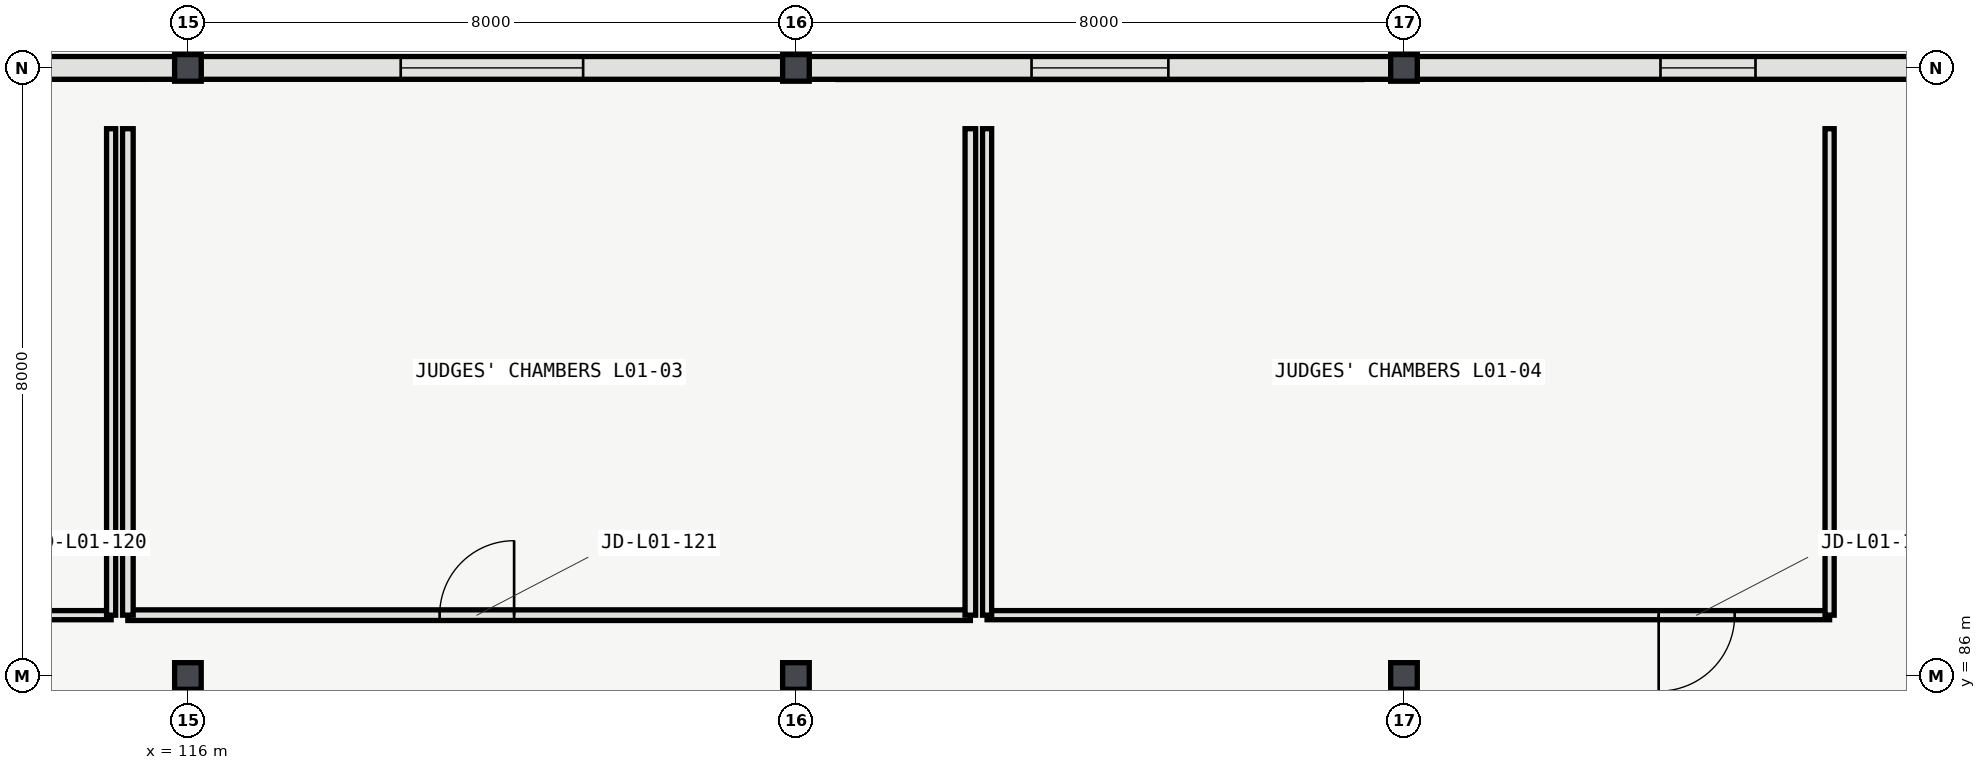
"""IFC4 building model, lengths in metres.
Left out: names, types, materials, properties, quantities, classifications, styles, units other than length and angle.
Written with IfcOpenShell. Run it as: python <this file> out.ifc"""

import sys

from ifc_helpers import new_model, si_unit, direction, frame, frame_2d, origin, origin_2d, place, context, subcontext, project, spatial, rectangle, i_section, extrude, element, fill, save


model = new_model("IFC4")
c1 = context("Model", 3, precision=1e-05, world=origin(), true_north=direction((0.0, 1.0)))
c2 = subcontext(c1, "Body", "Model", "MODEL_VIEW")
j1 = project(units=[si_unit("LENGTHUNIT", "METRE"), si_unit("PLANEANGLEUNIT", "RADIAN")], contexts=[c1])
p1 = place(None, origin())
s1 = spatial("IfcSite", under=j1, at=p1, CompositionType="ELEMENT")
p2 = place(p1, origin())
s2 = spatial("IfcBuilding", under=s1, at=p2, CompositionType="ELEMENT")
p3 = place(p2, frame((0.0, 0.0, 5.4)))
s3 = spatial("IfcBuildingStorey", under=s2, at=p3, CompositionType="ELEMENT", Elevation=5.4)
for number, where, z_axis, x_axis in (
    (1, (116.0, 86.0, 0.0), (0.0, 0.0, 1.0), (1.0, 0.0, 0.0)),
    (2, (116.0, 94.0, 0.0), (0.0, 0.0, 1.0), (1.0, 0.0, 0.0)),
    (3, (124.0, 86.0, 0.0), (0.0, 0.0, 1.0), (1.0, 0.0, 0.0)),
    (4, (124.0, 94.0, 0.0), (0.0, 0.0, 1.0), (1.0, 0.0, 0.0)),
    (5, (132.0, 86.0, 0.0), (0.0, 0.0, 1.0), (1.0, 0.0, 0.0)),
    (6, (132.0, 94.0, 0.0), (0.0, 0.0, 1.0), (1.0, 0.0, 0.0)),
):
    element("IfcColumn", number, at=place(p3, frame(where, z_axis=z_axis, x_axis=x_axis)), inside=s3, PredefinedType="COLUMN", context=c2, shape_type="SweptSolid", body=[
        extrude(i_section(OverallWidth=0.35, OverallDepth=0.35, WebThickness=0.012, FlangeThickness=0.019, FilletRadius=0.02, at=origin_2d()), origin(), (0.0, 0.0, 1.0), 5.4),
    ])
p4 = place(p3, frame((115.829, 94.0, 0.0), z_axis=(0.0, 0.0, 1.0), x_axis=(-1.0, 0.0, 0.0)))
e7 = element("IfcWall", 7, at=p4, inside=s3, PredefinedType="SOLIDWALL", context=c2, shape_type="SweptSolid", body=[
    extrude(rectangle(XDim=7.658, YDim=0.3, at=frame_2d((3.829, 0.0))), origin(), (0.0, 0.0, 1.0), 4.803),
])
p5 = place(p4, frame((2.779, 0.0, 0.95)))
e8 = element("IfcOpeningElement", 8, at=p5, cuts=e7, PredefinedType="OPENING", context=c2, shape_type="SweptSolid", body=[
    extrude(rectangle(XDim=2.1, YDim=1.2, at=frame_2d((1.05, 0.6))), frame((0.0, 0.16, 0.0), z_axis=(0.0, -1.0, 0.0), x_axis=(1.0, 0.0, 0.0)), (0.0, 0.0, 1.0), 0.32),
])
p6 = place(p3, frame((123.829, 94.0, 0.0), z_axis=(0.0, 0.0, 1.0), x_axis=(-1.0, 0.0, 0.0)))
e9 = element("IfcWall", 9, at=p6, inside=s3, PredefinedType="SOLIDWALL", context=c2, shape_type="SweptSolid", body=[
    extrude(rectangle(XDim=7.658, YDim=0.3, at=frame_2d((3.829, 0.0))), origin(), (0.0, 0.0, 1.0), 4.803),
])
p7 = place(p6, frame((2.629, 0.0, 0.95)))
e10 = element("IfcOpeningElement", 10, at=p7, cuts=e9, PredefinedType="OPENING", context=c2, shape_type="SweptSolid", body=[
    extrude(rectangle(XDim=2.4, YDim=1.5, at=frame_2d((1.2, 0.75))), frame((0.0, 0.16, 0.0), z_axis=(0.0, -1.0, 0.0), x_axis=(1.0, 0.0, 0.0)), (0.0, 0.0, 1.0), 0.32),
])
p8 = place(p3, frame((131.829, 94.0, 0.0), z_axis=(0.0, 0.0, 1.0), x_axis=(-1.0, 0.0, 0.0)))
e11 = element("IfcWall", 11, at=p8, inside=s3, PredefinedType="SOLIDWALL", context=c2, shape_type="SweptSolid", body=[
    extrude(rectangle(XDim=7.658, YDim=0.3, at=frame_2d((3.829, 0.0))), origin(), (0.0, 0.0, 1.0), 4.803),
])
p9 = place(p8, frame((2.929, 0.0, 0.95)))
e12 = element("IfcOpeningElement", 12, at=p9, cuts=e11, PredefinedType="OPENING", context=c2, shape_type="SweptSolid", body=[
    extrude(rectangle(XDim=1.8, YDim=1.5, at=frame_2d((0.9, 0.75))), frame((0.0, 0.16, 0.0), z_axis=(0.0, -1.0, 0.0), x_axis=(1.0, 0.0, 0.0)), (0.0, 0.0, 1.0), 0.32),
])
p10 = place(p3, frame((139.829, 94.0, 0.0), z_axis=(0.0, 0.0, 1.0), x_axis=(-1.0, 0.0, 0.0)))
e13 = element("IfcWall", 13, at=p10, inside=s3, PredefinedType="SOLIDWALL", context=c2, shape_type="SweptSolid", body=[
    extrude(rectangle(XDim=7.658, YDim=0.3, at=frame_2d((3.829, 0.0))), origin(), (0.0, 0.0, 1.0), 4.803),
])
p11 = place(p10, frame((3.204, 0.0, 0.95)))
e14 = element("IfcOpeningElement", 14, at=p11, cuts=e13, PredefinedType="OPENING", context=c2, shape_type="SweptSolid", body=[
    extrude(rectangle(XDim=1.25, YDim=1.6, at=frame_2d((0.625, 0.8))), frame((0.0, 0.16, 0.0), z_axis=(0.0, -1.0, 0.0), x_axis=(1.0, 0.0, 0.0)), (0.0, 0.0, 1.0), 0.32),
])
p12 = place(p3, frame((103.905, 86.8, 0.0), z_axis=(0.0, 0.0, 1.0), x_axis=(1.0, 0.0, 0.0)))
e15 = element("IfcWall", 15, at=p12, inside=s3, PredefinedType="PARTITIONING", context=c2, shape_type="SweptSolid", body=[
    extrude(rectangle(XDim=11.085, YDim=0.12, at=frame_2d((5.542, 0.0))), origin(), (0.0, 0.0, 1.0), 5.12),
])
p13 = place(p12, frame((7.888, 0.0, 0.0)))
e16 = element("IfcOpeningElement", 16, at=p13, cuts=e15, PredefinedType="OPENING", context=c2, shape_type="SweptSolid", body=[
    extrude(rectangle(XDim=1.0, YDim=2.2, at=frame_2d((0.5, 1.1))), frame((0.0, 0.07, 0.0), z_axis=(0.0, -1.0, 0.0), x_axis=(1.0, 0.0, 0.0)), (0.0, 0.0, 1.0), 0.14),
])
p14 = place(p3, frame((114.99, 86.8, 0.0), z_axis=(0.0, 0.0, 1.0), x_axis=(0.0, 1.0, 0.0)))
e17 = element("IfcWall", 17, at=p14, inside=s3, PredefinedType="PARTITIONING", context=c2, shape_type="SweptSolid", body=[
    extrude(rectangle(XDim=6.4, YDim=0.12, at=frame_2d((3.2, 0.0))), origin(), (0.0, 0.0, 1.0), 5.12),
])
p15 = place(p3, frame((115.21, 86.8, 0.0), z_axis=(0.0, 0.0, 1.0), x_axis=(1.0, 0.0, 0.0)))
e18 = element("IfcWall", 18, at=p15, inside=s3, PredefinedType="PARTITIONING", context=c2, shape_type="SweptSolid", body=[
    extrude(rectangle(XDim=11.085, YDim=0.14, at=frame_2d((5.542, 0.0))), origin(), (0.0, 0.0, 1.0), 5.12),
])
p16 = place(p15, frame((4.102, 0.0, 0.0)))
e19 = element("IfcOpeningElement", 19, at=p16, cuts=e18, PredefinedType="OPENING", context=c2, shape_type="SweptSolid", body=[
    extrude(rectangle(XDim=0.98, YDim=2.2, at=frame_2d((0.49, 1.1))), frame((0.0, 0.08, 0.0), z_axis=(0.0, -1.0, 0.0), x_axis=(1.0, 0.0, 0.0)), (0.0, 0.0, 1.0), 0.16),
])
for number, where, z_axis, x_axis in (
    (20, (115.21, 93.2, 0.0), (0.0, 0.0, 1.0), (0.0, -1.0, 0.0)),
    (21, (126.295, 86.8, 0.0), (0.0, 0.0, 1.0), (0.0, 1.0, 0.0)),
):
    element("IfcWall", number, at=place(p3, frame(where, z_axis=z_axis, x_axis=x_axis)), inside=s3, PredefinedType="PARTITIONING", context=c2, shape_type="SweptSolid", body=[
        extrude(rectangle(XDim=6.4, YDim=0.14, at=frame_2d((3.2, 0.0))), origin(), (0.0, 0.0, 1.0), 5.12),
    ])
p17 = place(p3, frame((126.515, 86.8, 0.0), z_axis=(0.0, 0.0, 1.0), x_axis=(1.0, 0.0, 0.0)))
e22 = element("IfcWall", 22, at=p17, inside=s3, PredefinedType="PARTITIONING", context=c2, shape_type="SweptSolid", body=[
    extrude(rectangle(XDim=11.085, YDim=0.12, at=frame_2d((5.542, 0.0))), origin(), (0.0, 0.0, 1.0), 5.12),
])
p18 = place(p17, frame((8.836, 0.0, 0.0)))
e23 = element("IfcOpeningElement", 23, at=p18, cuts=e22, PredefinedType="OPENING", context=c2, shape_type="SweptSolid", body=[
    extrude(rectangle(XDim=1.0, YDim=2.15, at=frame_2d((0.5, 1.075))), frame((0.0, 0.07, 0.0), z_axis=(0.0, -1.0, 0.0), x_axis=(1.0, 0.0, 0.0)), (0.0, 0.0, 1.0), 0.14),
])
for number, where, z_axis, x_axis in (
    (24, (126.515, 93.2, 0.0), (0.0, 0.0, 1.0), (0.0, -1.0, 0.0)),
    (25, (137.6, 86.8, 0.0), (0.0, 0.0, 1.0), (0.0, 1.0, 0.0)),
):
    element("IfcWall", number, at=place(p3, frame(where, z_axis=z_axis, x_axis=x_axis)), inside=s3, PredefinedType="PARTITIONING", context=c2, shape_type="SweptSolid", body=[
        extrude(rectangle(XDim=6.4, YDim=0.12, at=frame_2d((3.2, 0.0))), origin(), (0.0, 0.0, 1.0), 5.12),
    ])
p19 = place(p7, origin())
e26 = element("IfcWindow", 26, at=p19, inside=s3, PartitioningType="SINGLE_PANEL", PredefinedType="WINDOW", context=c2, shape_type="SweptSolid", body=[
    extrude(rectangle(XDim=2.4, YDim=1.5, at=frame_2d((1.2, 0.75))), frame((0.0, 0.03, 0.0), z_axis=(0.0, -1.0, 0.0), x_axis=(1.0, 0.0, 0.0)), (0.0, 0.0, 1.0), 0.06),
])
fill(e10, e26)
p20 = place(p9, origin())
e27 = element("IfcWindow", 27, at=p20, inside=s3, PartitioningType="SINGLE_PANEL", PredefinedType="WINDOW", context=c2, shape_type="SweptSolid", body=[
    extrude(rectangle(XDim=1.8, YDim=1.5, at=frame_2d((0.9, 0.75))), frame((0.0, 0.03, 0.0), z_axis=(0.0, -1.0, 0.0), x_axis=(1.0, 0.0, 0.0)), (0.0, 0.0, 1.0), 0.06),
])
fill(e12, e27)
p21 = place(p11, origin())
e28 = element("IfcWindow", 28, at=p21, inside=s3, PartitioningType="SINGLE_PANEL", PredefinedType="WINDOW", context=c2, shape_type="SweptSolid", body=[
    extrude(rectangle(XDim=1.25, YDim=1.6, at=frame_2d((0.625, 0.8))), frame((0.0, 0.03, 0.0), z_axis=(0.0, -1.0, 0.0), x_axis=(1.0, 0.0, 0.0)), (0.0, 0.0, 1.0), 0.06),
])
fill(e14, e28)
p22 = place(p16, origin())
e29 = element("IfcDoor", 29, at=p22, inside=s3, OperationType="SINGLE_SWING_RIGHT", PredefinedType="DOOR", context=c2, shape_type="SweptSolid", body=[
    extrude(rectangle(XDim=0.98, YDim=2.2, at=frame_2d((0.49, 1.1))), frame((0.0, 0.025, 0.0), z_axis=(0.0, -1.0, 0.0), x_axis=(1.0, 0.0, 0.0)), (0.0, 0.0, 1.0), 0.05),
])
fill(e19, e29)
p23 = place(p18, origin())
e30 = element("IfcDoor", 30, at=p23, inside=s3, OperationType="SINGLE_SWING_LEFT", PredefinedType="DOOR", context=c2, shape_type="SweptSolid", body=[
    extrude(rectangle(XDim=1.0, YDim=2.15, at=frame_2d((0.5, 1.075))), frame((0.0, 0.025, 0.0), z_axis=(0.0, -1.0, 0.0), x_axis=(1.0, 0.0, 0.0)), (0.0, 0.0, 1.0), 0.05),
])
fill(e23, e30)
save(model, sys.argv[1])
